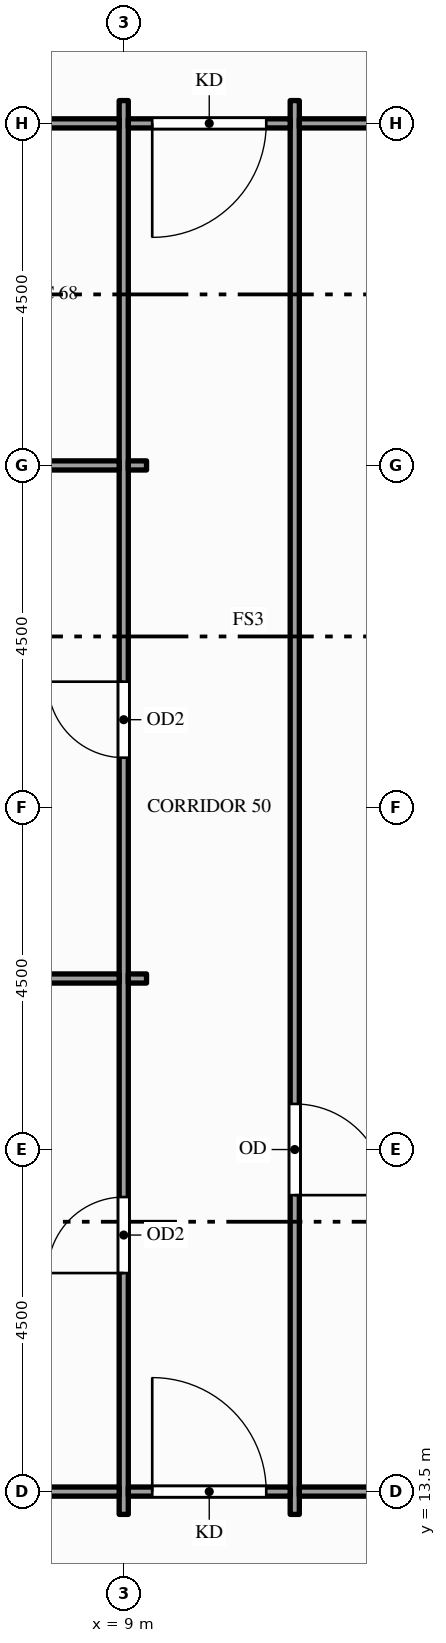
"""IFC4 building model, lengths in metres.
Left out: names, types, materials, properties, quantities, classifications, styles, units other than length and angle.
Written with IfcOpenShell. Run it as: python <this file> out.ifc"""

import sys

from ifc_helpers import new_model, si_unit, direction, frame, frame_2d, origin, place, context, subcontext, project, spatial, rectangle, extrude, element, fill, save


model = new_model("IFC4")
c1 = context("Model", 3, precision=1e-05, world=origin(), true_north=direction((0.0, 1.0)))
c2 = subcontext(c1, "Body", "Model", "MODEL_VIEW")
j1 = project(units=[si_unit("LENGTHUNIT", "METRE"), si_unit("PLANEANGLEUNIT", "RADIAN")], contexts=[c1])
p1 = place(None, origin())
s1 = spatial("IfcSite", under=j1, at=p1, CompositionType="ELEMENT")
p2 = place(p1, origin())
s2 = spatial("IfcBuilding", under=s1, at=p2, CompositionType="ELEMENT")
p3 = place(p2, frame((0.0, 0.0, 155.0)))
s3 = spatial("IfcBuildingStorey", under=s2, at=p3, CompositionType="ELEMENT", Elevation=155.0)
p4 = place(p3, frame((9.0, 13.2, 0.0), z_axis=(0.0, 0.0, 1.0), x_axis=(0.0, 1.0, 0.0)))
e1 = element("IfcWall", 1, at=p4, inside=s3, PredefinedType="PARTITIONING", context=c2, shape_type="SweptSolid", body=[
    extrude(rectangle(XDim=18.6, YDim=0.12, at=frame_2d((9.3, 0.0))), origin(), (0.0, 0.0, 1.0), 2.6),
])
p5 = place(p4, frame((3.175, 0.0, 0.0)))
e2 = element("IfcOpeningElement", 2, at=p5, cuts=e1, PredefinedType="OPENING", context=c2, shape_type="SweptSolid", body=[
    extrude(rectangle(XDim=1.0, YDim=2.1, at=frame_2d((0.5, 1.05))), frame((0.0, 0.07, 0.0), z_axis=(0.0, -1.0, 0.0), x_axis=(1.0, 0.0, 0.0)), (0.0, 0.0, 1.0), 0.14),
])
p6 = place(p4, frame((9.955, 0.0, 0.0)))
e3 = element("IfcOpeningElement", 3, at=p6, cuts=e1, PredefinedType="OPENING", context=c2, shape_type="SweptSolid", body=[
    extrude(rectangle(XDim=1.0, YDim=2.1, at=frame_2d((0.5, 1.05))), frame((0.0, 0.07, 0.0), z_axis=(0.0, -1.0, 0.0), x_axis=(1.0, 0.0, 0.0)), (0.0, 0.0, 1.0), 0.14),
])
p7 = place(p3, frame((11.25, 13.2, 0.0), z_axis=(0.0, 0.0, 1.0), x_axis=(0.0, 1.0, 0.0)))
e4 = element("IfcWall", 4, at=p7, inside=s3, PredefinedType="PARTITIONING", context=c2, shape_type="SweptSolid", body=[
    extrude(rectangle(XDim=18.6, YDim=0.12, at=frame_2d((9.3, 0.0))), origin(), (0.0, 0.0, 1.0), 2.6),
])
p8 = place(p7, frame((4.2, 0.0, 0.0)))
e5 = element("IfcOpeningElement", 5, at=p8, cuts=e4, PredefinedType="OPENING", context=c2, shape_type="SweptSolid", body=[
    extrude(rectangle(XDim=1.2, YDim=2.1, at=frame_2d((0.6, 1.05))), frame((0.0, 0.07, 0.0), z_axis=(0.0, -1.0, 0.0), x_axis=(1.0, 0.0, 0.0)), (0.0, 0.0, 1.0), 0.14),
])
p9 = place(p3, frame((0.15, 13.5, 0.0), z_axis=(0.0, 0.0, 1.0), x_axis=(1.0, 0.0, 0.0)))
e6 = element("IfcWall", 6, at=p9, inside=s3, PredefinedType="PARTITIONING", context=c2, shape_type="SweptSolid", body=[
    extrude(rectangle(XDim=8.79, YDim=0.12, at=frame_2d((4.395, 0.0))), origin(), (0.0, 0.0, 1.0), 2.87),
])
p10 = place(p3, frame((9.06, 13.5, 0.0), z_axis=(0.0, 0.0, 1.0), x_axis=(1.0, 0.0, 0.0)))
e7 = element("IfcWall", 7, at=p10, inside=s3, PredefinedType="PARTITIONING", context=c2, shape_type="SweptSolid", body=[
    extrude(rectangle(XDim=2.13, YDim=0.12, at=frame_2d((1.065, 0.0))), origin(), (0.0, 0.0, 1.0), 2.87),
])
p11 = place(p10, frame((0.315, 0.0, 0.0)))
e8 = element("IfcOpeningElement", 8, at=p11, cuts=e7, PredefinedType="OPENING", context=c2, shape_type="SweptSolid", body=[
    extrude(rectangle(XDim=1.5, YDim=2.1, at=frame_2d((0.75, 1.05))), frame((0.0, 0.07, 0.0), z_axis=(0.0, -1.0, 0.0), x_axis=(1.0, 0.0, 0.0)), (0.0, 0.0, 1.0), 0.14),
])
p12 = place(p3, frame((11.31, 13.5, 0.0), z_axis=(0.0, 0.0, 1.0), x_axis=(1.0, 0.0, 0.0)))
e9 = element("IfcWall", 9, at=p12, inside=s3, PredefinedType="PARTITIONING", context=c2, shape_type="SweptSolid", body=[
    extrude(rectangle(XDim=20.13, YDim=0.12, at=frame_2d((10.065, 0.0))), origin(), (0.0, 0.0, 1.0), 2.87),
])
p13 = place(p12, frame((9.165, 0.0, 0.0)))
e10 = element("IfcOpeningElement", 10, at=p13, cuts=e9, PredefinedType="OPENING", context=c2, shape_type="SweptSolid", body=[
    extrude(rectangle(XDim=1.8, YDim=2.1, at=frame_2d((0.9, 1.05))), frame((0.0, 0.07, 0.0), z_axis=(0.0, -1.0, 0.0), x_axis=(1.0, 0.0, 0.0)), (0.0, 0.0, 1.0), 0.14),
])
p14 = place(p3, frame((0.15, 20.25, 0.0), z_axis=(0.0, 0.0, 1.0), x_axis=(1.0, 0.0, 0.0)))
e11 = element("IfcWall", 11, at=p14, inside=s3, PredefinedType="PARTITIONING", context=c2, shape_type="SweptSolid", body=[
    extrude(rectangle(XDim=8.79, YDim=0.12, at=frame_2d((4.395, 0.0))), origin(), (0.0, 0.0, 1.0), 2.87),
])
p15 = place(p3, frame((9.06, 20.25, 0.0), z_axis=(0.0, 0.0, 1.0), x_axis=(1.0, 0.0, 0.0)))
e12 = element("IfcWall", 12, at=p15, inside=s3, PredefinedType="PARTITIONING", context=c2, shape_type="SweptSolid", body=[
    extrude(rectangle(XDim=0.24, YDim=0.12, at=frame_2d((0.12, 0.0))), origin(), (0.0, 0.0, 1.0), 2.87),
])
p16 = place(p3, frame((5.56, 27.0, 0.0), z_axis=(0.0, 0.0, 1.0), x_axis=(1.0, 0.0, 0.0)))
e13 = element("IfcWall", 13, at=p16, inside=s3, PredefinedType="PARTITIONING", context=c2, shape_type="SweptSolid", body=[
    extrude(rectangle(XDim=3.38, YDim=0.12, at=frame_2d((1.69, 0.0))), origin(), (0.0, 0.0, 1.0), 2.87),
])
p17 = place(p3, frame((9.06, 27.0, 0.0), z_axis=(0.0, 0.0, 1.0), x_axis=(1.0, 0.0, 0.0)))
e14 = element("IfcWall", 14, at=p17, inside=s3, PredefinedType="PARTITIONING", context=c2, shape_type="SweptSolid", body=[
    extrude(rectangle(XDim=0.24, YDim=0.12, at=frame_2d((0.12, 0.0))), origin(), (0.0, 0.0, 1.0), 2.87),
])
p18 = place(p3, frame((5.56, 31.5, 0.0), z_axis=(0.0, 0.0, 1.0), x_axis=(1.0, 0.0, 0.0)))
e15 = element("IfcWall", 15, at=p18, inside=s3, PredefinedType="PARTITIONING", context=c2, shape_type="SweptSolid", body=[
    extrude(rectangle(XDim=3.38, YDim=0.12, at=frame_2d((1.69, 0.0))), origin(), (0.0, 0.0, 1.0), 2.87),
])
p19 = place(p18, frame((1.19, 0.0, 0.0)))
e16 = element("IfcOpeningElement", 16, at=p19, cuts=e15, PredefinedType="OPENING", context=c2, shape_type="SweptSolid", body=[
    extrude(rectangle(XDim=1.0, YDim=2.1, at=frame_2d((0.5, 1.05))), frame((0.0, 0.07, 0.0), z_axis=(0.0, -1.0, 0.0), x_axis=(1.0, 0.0, 0.0)), (0.0, 0.0, 1.0), 0.14),
])
p20 = place(p3, frame((9.06, 31.5, 0.0), z_axis=(0.0, 0.0, 1.0), x_axis=(1.0, 0.0, 0.0)))
e17 = element("IfcWall", 17, at=p20, inside=s3, PredefinedType="PARTITIONING", context=c2, shape_type="SweptSolid", body=[
    extrude(rectangle(XDim=2.13, YDim=0.12, at=frame_2d((1.065, 0.0))), origin(), (0.0, 0.0, 1.0), 2.87),
])
p21 = place(p20, frame((0.315, 0.0, 0.0)))
e18 = element("IfcOpeningElement", 18, at=p21, cuts=e17, PredefinedType="OPENING", context=c2, shape_type="SweptSolid", body=[
    extrude(rectangle(XDim=1.5, YDim=2.1, at=frame_2d((0.75, 1.05))), frame((0.0, 0.07, 0.0), z_axis=(0.0, -1.0, 0.0), x_axis=(1.0, 0.0, 0.0)), (0.0, 0.0, 1.0), 0.14),
])
p22 = place(p3, frame((11.31, 31.5, 0.0), z_axis=(0.0, 0.0, 1.0), x_axis=(1.0, 0.0, 0.0)))
e19 = element("IfcWall", 19, at=p22, inside=s3, PredefinedType="PARTITIONING", context=c2, shape_type="SweptSolid", body=[
    extrude(rectangle(XDim=9.54, YDim=0.12, at=frame_2d((4.77, 0.0))), origin(), (0.0, 0.0, 1.0), 2.87),
])
p23 = place(p11, origin())
e20 = element("IfcDoor", 20, at=p23, inside=s3, OperationType="SINGLE_SWING_LEFT", PredefinedType="DOOR", context=c2, shape_type="SweptSolid", body=[
    extrude(rectangle(XDim=1.5, YDim=2.1, at=frame_2d((0.75, 1.05))), frame((0.0, 0.025, 0.0), z_axis=(0.0, -1.0, 0.0), x_axis=(1.0, 0.0, 0.0)), (0.0, 0.0, 1.0), 0.05),
])
fill(e8, e20)
p24 = place(p21, origin())
e21 = element("IfcDoor", 21, at=p24, inside=s3, OperationType="SINGLE_SWING_LEFT", PredefinedType="DOOR", context=c2, shape_type="SweptSolid", body=[
    extrude(rectangle(XDim=1.5, YDim=2.1, at=frame_2d((0.75, 1.05))), frame((0.0, 0.025, 0.0), z_axis=(0.0, -1.0, 0.0), x_axis=(1.0, 0.0, 0.0)), (0.0, 0.0, 1.0), 0.05),
])
fill(e18, e21)
p25 = place(p5, origin())
e22 = element("IfcDoor", 22, at=p25, inside=s3, OperationType="SINGLE_SWING_LEFT", PredefinedType="DOOR", context=c2, shape_type="SweptSolid", body=[
    extrude(rectangle(XDim=1.0, YDim=2.1, at=frame_2d((0.5, 1.05))), frame((0.0, 0.025, 0.0), z_axis=(0.0, -1.0, 0.0), x_axis=(1.0, 0.0, 0.0)), (0.0, 0.0, 1.0), 0.05),
])
fill(e2, e22)
p26 = place(p6, origin())
e23 = element("IfcDoor", 23, at=p26, inside=s3, OperationType="SINGLE_SWING_RIGHT", PredefinedType="DOOR", context=c2, shape_type="SweptSolid", body=[
    extrude(rectangle(XDim=1.0, YDim=2.1, at=frame_2d((0.5, 1.05))), frame((0.0, 0.025, 0.0), z_axis=(0.0, -1.0, 0.0), x_axis=(1.0, 0.0, 0.0)), (0.0, 0.0, 1.0), 0.05),
])
fill(e3, e23)
p27 = place(p8, origin())
e24 = element("IfcDoor", 24, at=p27, inside=s3, OperationType="SINGLE_SWING_LEFT", PredefinedType="DOOR", context=c2, shape_type="SweptSolid", body=[
    extrude(rectangle(XDim=1.2, YDim=2.1, at=frame_2d((0.6, 1.05))), frame((0.0, 0.025, 0.0), z_axis=(0.0, -1.0, 0.0), x_axis=(1.0, 0.0, 0.0)), (0.0, 0.0, 1.0), 0.05),
])
fill(e5, e24)
save(model, sys.argv[1])
